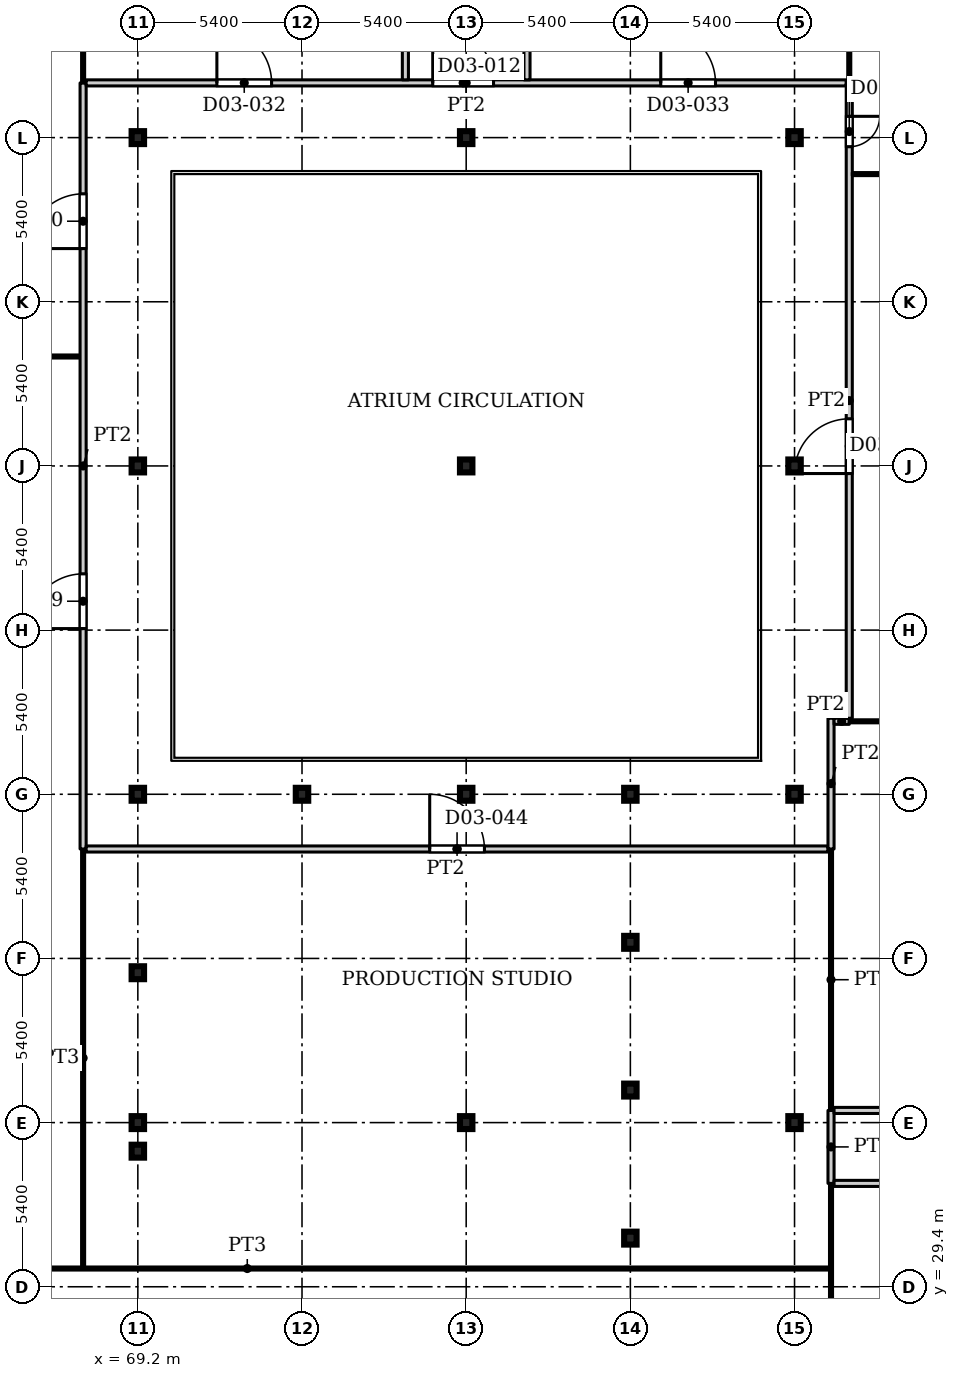
"""IFC4 building model, lengths in metres.
Left out: names, types, materials, properties, quantities, classifications, styles, units other than length and angle.
Written with IfcOpenShell. Run it as: python <this file> out.ifc"""

import sys

from ifc_helpers import new_model, si_unit, direction, frame, frame_2d, origin, origin_2d, place, context, subcontext, project, spatial, rectangle, i_section, extrude, source, transform, mapped, element, fill, save


model = new_model("IFC4")
c1 = context("Model", 3, precision=1e-05, world=origin(), true_north=direction((0.0, 1.0)))
c2 = subcontext(c1, "Body", "Model", "MODEL_VIEW")
j1 = project(units=[si_unit("LENGTHUNIT", "METRE"), si_unit("PLANEANGLEUNIT", "RADIAN")], contexts=[c1])
p1 = place(None, origin())
s1 = spatial("IfcSite", under=j1, at=p1, CompositionType="ELEMENT")
p2 = place(p1, origin())
s2 = spatial("IfcBuilding", under=s1, at=p2, CompositionType="ELEMENT")
p3 = place(p2, frame((0.0, 0.0, 17.0)))
s3 = spatial("IfcBuildingStorey", under=s2, at=p3, CompositionType="ELEMENT", Elevation=17.0)
for number, where, z_axis, x_axis in (
    (1, (69.2, 34.8, 0.0), (0.0, 0.0, 1.0), (1.0, 0.0, 0.0)),
    (2, (80.0, 34.8, 0.0), (0.0, 0.0, 1.0), (1.0, 0.0, 0.0)),
    (3, (90.8, 34.8, 0.0), (0.0, 0.0, 1.0), (1.0, 0.0, 0.0)),
    (4, (69.2, 45.6, 0.0), (0.0, 0.0, 1.0), (1.0, 0.0, 0.0)),
    (5, (80.0, 45.6, 0.0), (0.0, 0.0, 1.0), (1.0, 0.0, 0.0)),
    (6, (90.8, 45.6, 0.0), (0.0, 0.0, 1.0), (1.0, 0.0, 0.0)),
    (7, (69.2, 56.4, 0.0), (0.0, 0.0, 1.0), (1.0, 0.0, 0.0)),
    (8, (80.0, 56.4, 0.0), (0.0, 0.0, 1.0), (1.0, 0.0, 0.0)),
    (9, (90.8, 56.4, 0.0), (0.0, 0.0, 1.0), (1.0, 0.0, 0.0)),
    (10, (69.2, 67.2, 0.0), (0.0, 0.0, 1.0), (1.0, 0.0, 0.0)),
    (11, (80.0, 67.2, 0.0), (0.0, 0.0, 1.0), (1.0, 0.0, 0.0)),
    (12, (90.8, 67.2, 0.0), (0.0, 0.0, 1.0), (1.0, 0.0, 0.0)),
    (13, (74.6, 45.6, 0.0), (0.0, 0.0, 1.0), (1.0, 0.0, 0.0)),
    (14, (85.4, 45.6, 0.0), (0.0, 0.0, 1.0), (1.0, 0.0, 0.0)),
    (15, (85.4, 31.0, 0.0), (0.0, 0.0, 1.0), (1.0, 0.0, 0.0)),
    (16, (69.2, 33.86, 0.0), (0.0, 0.0, 1.0), (1.0, 0.0, 0.0)),
    (17, (85.4, 35.87, 0.0), (0.0, 0.0, 1.0), (1.0, 0.0, 0.0)),
    (18, (69.2, 39.73, 0.0), (0.0, 0.0, 1.0), (1.0, 0.0, 0.0)),
    (19, (85.4, 40.73, 0.0), (0.0, 0.0, 1.0), (1.0, 0.0, 0.0)),
):
    element("IfcColumn", number, at=place(p3, frame(where, z_axis=z_axis, x_axis=x_axis)), inside=s3, PredefinedType="COLUMN", context=c2, shape_type="SweptSolid", body=[
        extrude(i_section(OverallWidth=0.409, OverallDepth=0.425, WebThickness=0.033, FlangeThickness=0.052, FilletRadius=0.013, at=origin_2d()), origin(), (0.0, 0.0, 1.0), 4.5),
    ])
p4 = place(p3, frame((33.45, 60.0, 0.0), z_axis=(0.0, 0.0, 1.0), x_axis=(1.0, 0.0, 0.0)))
e20 = element("IfcWall", 20, at=p4, inside=s3, PredefinedType="PARTITIONING", context=c2, shape_type="SweptSolid", body=[
    extrude(rectangle(XDim=33.85, YDim=0.1, at=frame_2d((16.925, 0.0))), origin(), (0.0, 0.0, 1.0), 4.18),
])
p5 = place(p3, frame((53.649, 30.0, 0.0), z_axis=(0.0, 0.0, 1.0), x_axis=(1.0, 0.0, 0.0)))
e21 = element("IfcWall", 21, at=p5, inside=s3, PredefinedType="PARTITIONING", context=c2, shape_type="SweptSolid", body=[
    extrude(rectangle(XDim=38.301, YDim=0.1, at=frame_2d((19.15, 0.0))), origin(), (0.0, 0.0, 1.0), 4.18),
])
p6 = place(p3, frame((67.4, 30.05, 0.0), z_axis=(0.0, 0.0, 1.0), x_axis=(0.0, 1.0, 0.0)))
e22 = element("IfcWall", 22, at=p6, inside=s3, PredefinedType="PARTITIONING", context=c2, shape_type="SweptSolid", body=[
    extrude(rectangle(XDim=13.75, YDim=0.1, at=frame_2d((6.875, 0.0))), origin(), (0.0, 0.0, 1.0), 4.18),
])
p7 = place(p3, frame((67.4, 43.8, 0.0), z_axis=(0.0, 0.0, 1.0), x_axis=(0.0, 1.0, 0.0)))
e23 = element("IfcWall", 23, at=p7, inside=s3, PredefinedType="PARTITIONING", context=c2, shape_type="SweptSolid", body=[
    extrude(rectangle(XDim=25.2, YDim=0.2, at=frame_2d((12.6, 0.0))), origin(), (0.0, 0.0, 1.0), 4.18),
])
p8 = place(p7, frame((7.25, 0.0, 0.0)))
e24 = element("IfcOpeningElement", 24, at=p8, cuts=e23, PredefinedType="OPENING", context=c2, shape_type="SweptSolid", body=[
    extrude(rectangle(XDim=1.8, YDim=2.1, at=frame_2d((0.9, 1.05))), frame((0.0, 0.11, 0.0), z_axis=(0.0, -1.0, 0.0), x_axis=(1.0, 0.0, 0.0)), (0.0, 0.0, 1.0), 0.22),
])
p9 = place(p7, frame((19.75, 0.0, 0.0)))
e25 = element("IfcOpeningElement", 25, at=p9, cuts=e23, PredefinedType="OPENING", context=c2, shape_type="SweptSolid", body=[
    extrude(rectangle(XDim=1.8, YDim=2.1, at=frame_2d((0.9, 1.05))), frame((0.0, 0.11, 0.0), z_axis=(0.0, -1.0, 0.0), x_axis=(1.0, 0.0, 0.0)), (0.0, 0.0, 1.0), 0.22),
])
p10 = place(p3, frame((67.4, 69.0, 0.0), z_axis=(0.0, 0.0, 1.0), x_axis=(0.0, 1.0, 0.0)))
e26 = element("IfcWall", 26, at=p10, inside=s3, PredefinedType="PARTITIONING", context=c2, shape_type="SweptSolid", body=[
    extrude(rectangle(XDim=21.738, YDim=0.1, at=frame_2d((10.869, 0.0))), origin(), (0.0, 0.0, 1.0), 4.18),
])
p11 = place(p3, frame((67.5, 43.8, 0.0), z_axis=(0.0, 0.0, 1.0), x_axis=(1.0, 0.0, 0.0)))
e27 = element("IfcWall", 27, at=p11, inside=s3, PredefinedType="PARTITIONING", context=c2, shape_type="SweptSolid", body=[
    extrude(rectangle(XDim=24.4, YDim=0.2, at=frame_2d((12.2, 0.0))), origin(), (0.0, 0.0, 1.0), 4.18),
])
p12 = place(p11, frame((11.3, 0.0, 0.0)))
e28 = element("IfcOpeningElement", 28, at=p12, cuts=e27, PredefinedType="OPENING", context=c2, shape_type="SweptSolid", body=[
    extrude(rectangle(XDim=1.8, YDim=2.1, at=frame_2d((0.9, 1.05))), frame((0.0, 0.11, 0.0), z_axis=(0.0, -1.0, 0.0), x_axis=(1.0, 0.0, 0.0)), (0.0, 0.0, 1.0), 0.22),
])
p13 = place(p3, frame((67.5, 69.0, 0.0), z_axis=(0.0, 0.0, 1.0), x_axis=(1.0, 0.0, 0.0)))
e29 = element("IfcWall", 29, at=p13, inside=s3, PredefinedType="PARTITIONING", context=c2, shape_type="SweptSolid", body=[
    extrude(rectangle(XDim=25.0, YDim=0.2, at=frame_2d((12.5, 0.0))), origin(), (0.0, 0.0, 1.0), 4.18),
])
p14 = place(p13, frame((11.4, 0.0, 0.0)))
e30 = element("IfcOpeningElement", 30, at=p14, cuts=e29, PredefinedType="OPENING", context=c2, shape_type="SweptSolid", body=[
    extrude(rectangle(XDim=2.0, YDim=2.1, at=frame_2d((1.0, 1.05))), frame((0.0, 0.11, 0.0), z_axis=(0.0, -1.0, 0.0), x_axis=(1.0, 0.0, 0.0)), (0.0, 0.0, 1.0), 0.22),
])
p15 = place(p13, frame((4.3, 0.0, 0.0)))
e31 = element("IfcOpeningElement", 31, at=p15, cuts=e29, PredefinedType="OPENING", context=c2, shape_type="SweptSolid", body=[
    extrude(rectangle(XDim=1.8, YDim=2.1, at=frame_2d((0.9, 1.05))), frame((0.0, 0.11, 0.0), z_axis=(0.0, -1.0, 0.0), x_axis=(1.0, 0.0, 0.0)), (0.0, 0.0, 1.0), 0.22),
])
p16 = place(p13, frame((18.9, 0.0, 0.0)))
e32 = element("IfcOpeningElement", 32, at=p16, cuts=e29, PredefinedType="OPENING", context=c2, shape_type="SweptSolid", body=[
    extrude(rectangle(XDim=1.8, YDim=2.1, at=frame_2d((0.9, 1.05))), frame((0.0, 0.11, 0.0), z_axis=(0.0, -1.0, 0.0), x_axis=(1.0, 0.0, 0.0)), (0.0, 0.0, 1.0), 0.22),
])
for number, where, z_axis, x_axis in (
    (33, (78.0, 69.1, 0.0), (0.0, 0.0, 1.0), (0.0, 1.0, 0.0)),
    (34, (82.0, 69.1, 0.0), (0.0, 0.0, 1.0), (0.0, 1.0, 0.0)),
):
    element("IfcWall", number, at=place(p3, frame(where, z_axis=z_axis, x_axis=x_axis)), inside=s3, PredefinedType="PARTITIONING", context=c2, shape_type="SweptSolid", body=[
        extrude(rectangle(XDim=21.6, YDim=0.2, at=frame_2d((10.8, 0.0))), origin(), (0.0, 0.0, 1.0), 4.18),
    ])
p17 = place(p3, frame((92.0, 22.05, 0.0), z_axis=(0.0, 0.0, 1.0), x_axis=(0.0, 1.0, 0.0)))
e35 = element("IfcWall", 35, at=p17, inside=s3, PredefinedType="PARTITIONING", context=c2, shape_type="SweptSolid", body=[
    extrude(rectangle(XDim=10.75, YDim=0.1, at=frame_2d((5.375, 0.0))), origin(), (0.0, 0.0, 1.0), 4.18),
])
p18 = place(p3, frame((92.0, 32.8, 0.0), z_axis=(0.0, 0.0, 1.0), x_axis=(0.0, 1.0, 0.0)))
e36 = element("IfcWall", 36, at=p18, inside=s3, PredefinedType="PARTITIONING", context=c2, shape_type="SweptSolid", body=[
    extrude(rectangle(XDim=2.4, YDim=0.2, at=frame_2d((1.2, 0.0))), origin(), (0.0, 0.0, 1.0), 4.18),
])
p19 = place(p3, frame((92.0, 35.2, 0.0), z_axis=(0.0, 0.0, 1.0), x_axis=(0.0, 1.0, 0.0)))
e37 = element("IfcWall", 37, at=p19, inside=s3, PredefinedType="PARTITIONING", context=c2, shape_type="SweptSolid", body=[
    extrude(rectangle(XDim=8.6, YDim=0.1, at=frame_2d((4.3, 0.0))), origin(), (0.0, 0.0, 1.0), 4.18),
])
p20 = place(p3, frame((92.0, 43.8, 0.0), z_axis=(0.0, 0.0, 1.0), x_axis=(0.0, 1.0, 0.0)))
e38 = element("IfcWall", 38, at=p20, inside=s3, PredefinedType="PARTITIONING", context=c2, shape_type="SweptSolid", body=[
    extrude(rectangle(XDim=4.3, YDim=0.2, at=frame_2d((2.15, 0.0))), origin(), (0.0, 0.0, 1.0), 4.18),
])
p21 = place(p3, frame((92.1, 32.8, 0.0), z_axis=(0.0, 0.0, 1.0), x_axis=(1.0, 0.0, 0.0)))
e39 = element("IfcWall", 39, at=p21, inside=s3, PredefinedType="PARTITIONING", context=c2, shape_type="SweptSolid", body=[
    extrude(rectangle(XDim=32.881, YDim=0.2, at=frame_2d((16.44, 0.0))), origin(), (0.0, 0.0, 1.0), 4.18),
])
p22 = place(p21, frame((6.3, 0.0, 0.0)))
e40 = element("IfcOpeningElement", 40, at=p22, cuts=e39, PredefinedType="OPENING", context=c2, shape_type="SweptSolid", body=[
    extrude(rectangle(XDim=1.0, YDim=2.1, at=frame_2d((0.5, 1.05))), frame((0.0, 0.11, 0.0), z_axis=(0.0, -1.0, 0.0), x_axis=(1.0, 0.0, 0.0)), (0.0, 0.0, 1.0), 0.22),
])
p23 = place(p21, frame((19.3, 0.0, 0.0)))
e41 = element("IfcOpeningElement", 41, at=p23, cuts=e39, PredefinedType="OPENING", context=c2, shape_type="SweptSolid", body=[
    extrude(rectangle(XDim=1.0, YDim=2.1, at=frame_2d((0.5, 1.05))), frame((0.0, 0.11, 0.0), z_axis=(0.0, -1.0, 0.0), x_axis=(1.0, 0.0, 0.0)), (0.0, 0.0, 1.0), 0.22),
])
p24 = place(p21, frame((29.05, 0.0, 0.0)))
e42 = element("IfcOpeningElement", 42, at=p24, cuts=e39, PredefinedType="OPENING", context=c2, shape_type="SweptSolid", body=[
    extrude(rectangle(XDim=1.0, YDim=2.1, at=frame_2d((0.5, 1.05))), frame((0.0, 0.11, 0.0), z_axis=(0.0, -1.0, 0.0), x_axis=(1.0, 0.0, 0.0)), (0.0, 0.0, 1.0), 0.22),
])
p25 = place(p3, frame((92.1, 35.2, 0.0), z_axis=(0.0, 0.0, 1.0), x_axis=(1.0, 0.0, 0.0)))
e43 = element("IfcWall", 43, at=p25, inside=s3, PredefinedType="PARTITIONING", context=c2, shape_type="SweptSolid", body=[
    extrude(rectangle(XDim=32.88, YDim=0.2, at=frame_2d((16.44, 0.0))), origin(), (0.0, 0.0, 1.0), 4.18),
])
p26 = place(p25, frame((4.909, 0.0, 0.0)))
e44 = element("IfcOpeningElement", 44, at=p26, cuts=e43, PredefinedType="OPENING", context=c2, shape_type="SweptSolid", body=[
    extrude(rectangle(XDim=1.0, YDim=2.1, at=frame_2d((0.5, 1.05))), frame((0.0, 0.11, 0.0), z_axis=(0.0, -1.0, 0.0), x_axis=(1.0, 0.0, 0.0)), (0.0, 0.0, 1.0), 0.22),
])
p27 = place(p25, frame((13.932, 0.0, 0.0)))
e45 = element("IfcOpeningElement", 45, at=p27, cuts=e43, PredefinedType="OPENING", context=c2, shape_type="SweptSolid", body=[
    extrude(rectangle(XDim=1.0, YDim=2.1, at=frame_2d((0.5, 1.05))), frame((0.0, 0.11, 0.0), z_axis=(0.0, -1.0, 0.0), x_axis=(1.0, 0.0, 0.0)), (0.0, 0.0, 1.0), 0.22),
])
p28 = place(p25, frame((23.091, 0.0, 0.0)))
e46 = element("IfcOpeningElement", 46, at=p28, cuts=e43, PredefinedType="OPENING", context=c2, shape_type="SweptSolid", body=[
    extrude(rectangle(XDim=1.0, YDim=2.1, at=frame_2d((0.5, 1.05))), frame((0.0, 0.11, 0.0), z_axis=(0.0, -1.0, 0.0), x_axis=(1.0, 0.0, 0.0)), (0.0, 0.0, 1.0), 0.22),
])
p29 = place(p25, frame((29.477, 0.0, 0.0)))
e47 = element("IfcOpeningElement", 47, at=p29, cuts=e43, PredefinedType="OPENING", context=c2, shape_type="SweptSolid", body=[
    extrude(rectangle(XDim=1.0, YDim=2.1, at=frame_2d((0.5, 1.05))), frame((0.0, 0.11, 0.0), z_axis=(0.0, -1.0, 0.0), x_axis=(1.0, 0.0, 0.0)), (0.0, 0.0, 1.0), 0.22),
])
p30 = place(p3, frame((92.1, 48.0, 0.0), z_axis=(0.0, 0.0, 1.0), x_axis=(1.0, 0.0, 0.0)))
e48 = element("IfcWall", 48, at=p30, inside=s3, PredefinedType="PARTITIONING", context=c2, shape_type="SweptSolid", body=[
    extrude(rectangle(XDim=0.5, YDim=0.2, at=frame_2d((0.25, 0.0))), origin(), (0.0, 0.0, 1.0), 4.18),
])
p31 = place(p3, frame((92.6, 48.0, 0.0), z_axis=(0.0, 0.0, 1.0), x_axis=(1.0, 0.0, 0.0)))
e49 = element("IfcWall", 49, at=p31, inside=s3, PredefinedType="PARTITIONING", context=c2, shape_type="SweptSolid", body=[
    extrude(rectangle(XDim=20.138, YDim=0.1, at=frame_2d((10.069, 0.0))), origin(), (0.0, 0.0, 1.0), 4.18),
])
p32 = place(p3, frame((92.6, 48.1, 0.0), z_axis=(0.0, 0.0, 1.0), x_axis=(0.0, 1.0, 0.0)))
e50 = element("IfcWall", 50, at=p32, inside=s3, PredefinedType="PARTITIONING", context=c2, shape_type="SweptSolid", body=[
    extrude(rectangle(XDim=20.9, YDim=0.2, at=frame_2d((10.45, 0.0))), origin(), (0.0, 0.0, 1.0), 4.18),
])
p33 = place(p32, frame((8.05, 0.0, 0.0)))
e51 = element("IfcOpeningElement", 51, at=p33, cuts=e50, PredefinedType="OPENING", context=c2, shape_type="SweptSolid", body=[
    extrude(rectangle(XDim=1.8, YDim=2.1, at=frame_2d((0.9, 1.05))), frame((0.0, 0.11, 0.0), z_axis=(0.0, -1.0, 0.0), x_axis=(1.0, 0.0, 0.0)), (0.0, 0.0, 1.0), 0.22),
])
p34 = place(p32, frame((18.8, 0.0, 0.0)))
e52 = element("IfcOpeningElement", 52, at=p34, cuts=e50, PredefinedType="OPENING", context=c2, shape_type="SweptSolid", body=[
    extrude(rectangle(XDim=1.0, YDim=2.1, at=frame_2d((0.5, 1.05))), frame((0.0, 0.11, 0.0), z_axis=(0.0, -1.0, 0.0), x_axis=(1.0, 0.0, 0.0)), (0.0, 0.0, 1.0), 0.22),
])
p35 = place(p3, frame((92.6, 69.0, 0.0), z_axis=(0.0, 0.0, 1.0), x_axis=(0.0, 1.0, 0.0)))
e53 = element("IfcWall", 53, at=p35, inside=s3, PredefinedType="PARTITIONING", context=c2, shape_type="SweptSolid", body=[
    extrude(rectangle(XDim=21.738, YDim=0.1, at=frame_2d((10.869, 0.0))), origin(), (0.0, 0.0, 1.0), 4.18),
])
p36 = place(p3, frame((92.7, 66.0, 0.0), z_axis=(0.0, 0.0, 1.0), x_axis=(1.0, 0.0, 0.0)))
e54 = element("IfcWall", 54, at=p36, inside=s3, PredefinedType="PARTITIONING", context=c2, shape_type="SweptSolid", body=[
    extrude(rectangle(XDim=20.038, YDim=0.1, at=frame_2d((10.019, 0.0))), origin(), (0.0, 0.0, 1.0), 4.18),
])
m1 = source(origin(), c2, "Body", "SweptSolid", [
    extrude(rectangle(XDim=1.8, YDim=2.1, at=frame_2d((0.9, 1.05))), frame((0.0, 0.025, 0.0), z_axis=(0.0, -1.0, 0.0), x_axis=(1.0, 0.0, 0.0)), (0.0, 0.0, 1.0), 0.05),
])
p37 = place(p33, origin())
e55 = element("IfcDoor", 55, at=p37, inside=s3, OperationType="DOUBLE_DOOR_SINGLE_SWING", PredefinedType="DOOR", context=c2, shape_type="MappedRepresentation", body=[
    mapped(m1, transform((0.0, 0.0, 0.0), x_axis=(1.0, 0.0, 0.0), y_axis=(0.0, 1.0, 0.0), z_axis=(0.0, 0.0, 1.0), scale=1.0)),
])
fill(e51, e55)
m2 = source(origin(), c2, "Body", "SweptSolid", [
    extrude(rectangle(XDim=1.0, YDim=2.1, at=frame_2d((0.5, 1.05))), frame((0.0, 0.025, 0.0), z_axis=(0.0, -1.0, 0.0), x_axis=(1.0, 0.0, 0.0)), (0.0, 0.0, 1.0), 0.05),
])
p38 = place(p34, origin())
e56 = element("IfcDoor", 56, at=p38, inside=s3, OperationType="SINGLE_SWING_RIGHT", PredefinedType="DOOR", context=c2, shape_type="MappedRepresentation", body=[
    mapped(m2, transform((0.0, 0.0, 0.0), x_axis=(1.0, 0.0, 0.0), y_axis=(0.0, 1.0, 0.0), z_axis=(0.0, 0.0, 1.0), scale=1.0)),
])
fill(e52, e56)
m3 = source(origin(), c2, "Body", "SweptSolid", [
    extrude(rectangle(XDim=2.0, YDim=2.1, at=frame_2d((1.0, 1.05))), frame((0.0, 0.025, 0.0), z_axis=(0.0, -1.0, 0.0), x_axis=(1.0, 0.0, 0.0)), (0.0, 0.0, 1.0), 0.05),
])
p39 = place(p14, origin())
e57 = element("IfcDoor", 57, at=p39, inside=s3, OperationType="DOUBLE_DOOR_SINGLE_SWING", PredefinedType="DOOR", context=c2, shape_type="MappedRepresentation", body=[
    mapped(m3, transform((0.0, 0.0, 0.0), x_axis=(1.0, 0.0, 0.0), y_axis=(0.0, 1.0, 0.0), z_axis=(0.0, 0.0, 1.0), scale=1.0)),
])
fill(e30, e57)
p40 = place(p15, origin())
e58 = element("IfcDoor", 58, at=p40, inside=s3, OperationType="DOUBLE_DOOR_SINGLE_SWING", PredefinedType="DOOR", context=c2, shape_type="MappedRepresentation", body=[
    mapped(m1, transform((0.0, 0.0, 0.0), x_axis=(1.0, 0.0, 0.0), y_axis=(0.0, 1.0, 0.0), z_axis=(0.0, 0.0, 1.0), scale=1.0)),
])
fill(e31, e58)
p41 = place(p16, origin())
e59 = element("IfcDoor", 59, at=p41, inside=s3, OperationType="DOUBLE_DOOR_SINGLE_SWING", PredefinedType="DOOR", context=c2, shape_type="MappedRepresentation", body=[
    mapped(m1, transform((0.0, 0.0, 0.0), x_axis=(1.0, 0.0, 0.0), y_axis=(0.0, 1.0, 0.0), z_axis=(0.0, 0.0, 1.0), scale=1.0)),
])
fill(e32, e59)
p42 = place(p12, origin())
e60 = element("IfcDoor", 60, at=p42, inside=s3, OperationType="DOUBLE_DOOR_SINGLE_SWING", PredefinedType="DOOR", context=c2, shape_type="MappedRepresentation", body=[
    mapped(m1, transform((0.0, 0.0, 0.0), x_axis=(1.0, 0.0, 0.0), y_axis=(0.0, 1.0, 0.0), z_axis=(0.0, 0.0, 1.0), scale=1.0)),
])
fill(e28, e60)
p43 = place(p8, origin())
e61 = element("IfcDoor", 61, at=p43, inside=s3, OperationType="DOUBLE_DOOR_SINGLE_SWING", PredefinedType="DOOR", context=c2, shape_type="MappedRepresentation", body=[
    mapped(m1, transform((0.0, 0.0, 0.0), x_axis=(1.0, 0.0, 0.0), y_axis=(0.0, 1.0, 0.0), z_axis=(0.0, 0.0, 1.0), scale=1.0)),
])
fill(e24, e61)
p44 = place(p9, origin())
e62 = element("IfcDoor", 62, at=p44, inside=s3, OperationType="DOUBLE_DOOR_SINGLE_SWING", PredefinedType="DOOR", context=c2, shape_type="MappedRepresentation", body=[
    mapped(m1, transform((0.0, 0.0, 0.0), x_axis=(1.0, 0.0, 0.0), y_axis=(0.0, 1.0, 0.0), z_axis=(0.0, 0.0, 1.0), scale=1.0)),
])
fill(e25, e62)
save(model, sys.argv[1])
